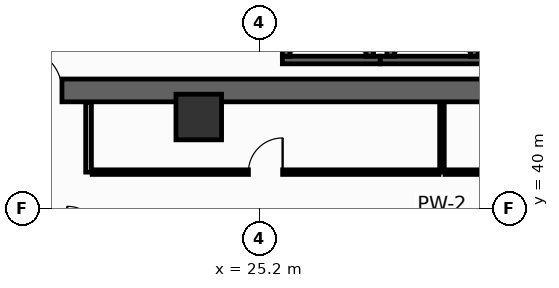
"""IFC4 building model, lengths in metres.
Left out: names, types, materials, properties, quantities, classifications, styles, units other than length and angle.
Written with IfcOpenShell. Run it as: python <this file> out.ifc"""

import sys

from ifc_helpers import new_model, si_unit, direction, frame, frame_2d, origin, origin_2d, place, context, subcontext, project, spatial, rectangle, hollow_rectangle, extrude, element, fill, save


model = new_model("IFC4")
c1 = context("Model", 3, precision=1e-05, world=origin(), true_north=direction((0.0, 1.0)))
c2 = subcontext(c1, "Body", "Model", "MODEL_VIEW")
j1 = project(units=[si_unit("LENGTHUNIT", "METRE"), si_unit("PLANEANGLEUNIT", "RADIAN")], contexts=[c1])
p1 = place(None, origin())
s1 = spatial("IfcSite", under=j1, at=p1, CompositionType="ELEMENT")
p2 = place(p1, origin())
s2 = spatial("IfcBuilding", under=s1, at=p2, CompositionType="ELEMENT")
p3 = place(p2, frame((0.0, 0.0, 97.2)))
s3 = spatial("IfcBuildingStorey", under=s2, at=p3, CompositionType="ELEMENT", Elevation=97.2)
p4 = place(p3, frame((13.5, 43.1, 0.0), z_axis=(0.0, 0.0, 1.0), x_axis=(1.0, 0.0, 0.0)))
e1 = element("IfcWall", 1, at=p4, inside=s3, PredefinedType="SHEAR", context=c2, shape_type="SweptSolid", body=[
    extrude(rectangle(XDim=32.9, YDim=0.6, at=frame_2d((16.45, 0.0))), origin(), (0.0, 0.0, 1.0), 4.15),
])
p5 = place(p4, frame((5.4, 0.0, 0.0)))
e2 = element("IfcOpeningElement", 2, at=p5, cuts=e1, PredefinedType="OPENING", context=c2, shape_type="SweptSolid", body=[
    extrude(rectangle(XDim=1.1, YDim=2.15, at=frame_2d((0.55, 1.075))), frame((0.0, 0.31, 0.0), z_axis=(0.0, -1.0, 0.0), x_axis=(1.0, 0.0, 0.0)), (0.0, 0.0, 1.0), 0.62),
])
p6 = place(p4, frame((25.6, 0.0, 0.0)))
e3 = element("IfcOpeningElement", 3, at=p6, cuts=e1, PredefinedType="OPENING", context=c2, shape_type="SweptSolid", body=[
    extrude(rectangle(XDim=1.1, YDim=2.15, at=frame_2d((0.55, 1.075))), frame((0.0, 0.31, 0.0), z_axis=(0.0, -1.0, 0.0), x_axis=(1.0, 0.0, 0.0)), (0.0, 0.0, 1.0), 0.62),
])
p7 = place(p3, frame((23.6, 42.4, 0.0), z_axis=(0.0, 0.0, 1.0), x_axis=(1.0, 0.0, 0.0)))
e4 = element("IfcColumn", 4, at=p7, inside=s3, PredefinedType="COLUMN", context=c2, shape_type="SweptSolid", body=[
    extrude(hollow_rectangle(XDim=1.2, YDim=1.2, WallThickness=0.055, at=origin_2d()), origin(), (0.0, 0.0, 1.0), 4.4),
])
p8 = place(p3, frame((25.8, 43.9, 0.0), z_axis=(0.0, 0.0, 1.0), x_axis=(1.0, 0.0, 0.0)))
e5 = element("IfcWall", 5, at=p8, inside=s3, PredefinedType="SHEAR", context=c2, shape_type="SweptSolid", body=[
    extrude(rectangle(XDim=2.575, YDim=0.2, at=frame_2d((1.288, 0.0))), origin(), (0.0, 0.0, 1.0), 4.15),
])
for number, where, z_axis, x_axis in (
    (6, (25.9, 44.0, 0.0), (0.0, 0.0, 1.0), (0.0, 1.0, 0.0)),
    (7, (28.1, 44.0, 0.0), (0.0, 0.0, 1.0), (0.0, 1.0, 0.0)),
):
    element("IfcWall", number, at=place(p3, frame(where, z_axis=z_axis, x_axis=x_axis)), inside=s3, PredefinedType="SHEAR", context=c2, shape_type="SweptSolid", body=[
        extrude(rectangle(XDim=2.3, YDim=0.2, at=frame_2d((1.15, 0.0))), origin(), (0.0, 0.0, 1.0), 4.15),
    ])
p9 = place(p3, frame((28.375, 43.9, 0.0), z_axis=(0.0, 0.0, 1.0), x_axis=(1.0, 0.0, 0.0)))
e8 = element("IfcWall", 8, at=p9, inside=s3, PredefinedType="SHEAR", context=c2, shape_type="SweptSolid", body=[
    extrude(rectangle(XDim=2.75, YDim=0.2, at=frame_2d((1.375, 0.0))), origin(), (0.0, 0.0, 1.0), 4.15),
])
for number, where, z_axis, x_axis in (
    (9, (28.65, 44.0, 0.0), (0.0, 0.0, 1.0), (0.0, 1.0, 0.0)),
    (10, (30.85, 44.0, 0.0), (0.0, 0.0, 1.0), (0.0, 1.0, 0.0)),
):
    element("IfcWall", number, at=place(p3, frame(where, z_axis=z_axis, x_axis=x_axis)), inside=s3, PredefinedType="SHEAR", context=c2, shape_type="SweptSolid", body=[
        extrude(rectangle(XDim=2.3, YDim=0.2, at=frame_2d((1.15, 0.0))), origin(), (0.0, 0.0, 1.0), 4.15),
    ])
p10 = place(p3, frame((20.7, 40.95, 0.0), z_axis=(0.0, 0.0, 1.0), x_axis=(0.0, 1.0, 0.0)))
e11 = element("IfcWall", 11, at=p10, inside=s3, PredefinedType="PARTITIONING", context=c2, shape_type="SweptSolid", body=[
    extrude(rectangle(XDim=1.83, YDim=0.15, at=frame_2d((0.915, 0.0))), origin(), (0.0, 0.0, 1.0), 4.15),
])
p11 = place(p3, frame((30.0, 40.95, 0.0), z_axis=(0.0, 0.0, 1.0), x_axis=(0.0, 1.0, 0.0)))
e12 = element("IfcWall", 12, at=p11, inside=s3, PredefinedType="PARTITIONING", context=c2, shape_type="SweptSolid", body=[
    extrude(rectangle(XDim=1.83, YDim=0.12, at=frame_2d((0.915, 0.0))), origin(), (0.0, 0.0, 1.0), 3.335),
])
p12 = place(p3, frame((20.795, 40.95, 0.0), z_axis=(0.0, 0.0, 1.0), x_axis=(1.0, 0.0, 0.0)))
e13 = element("IfcWall", 13, at=p12, inside=s3, PredefinedType="PARTITIONING", context=c2, shape_type="SweptSolid", body=[
    extrude(rectangle(XDim=9.125, YDim=0.12, at=frame_2d((4.562, 0.0))), origin(), (0.0, 0.0, 1.0), 2.735),
])
p13 = place(p12, frame((4.112, 0.0, 0.0)))
e14 = element("IfcOpeningElement", 14, at=p13, cuts=e13, PredefinedType="OPENING", context=c2, shape_type="SweptSolid", body=[
    extrude(rectangle(XDim=0.9, YDim=2.1, at=frame_2d((0.45, 1.05))), frame((0.0, 0.07, 0.0), z_axis=(0.0, -1.0, 0.0), x_axis=(1.0, 0.0, 0.0)), (0.0, 0.0, 1.0), 0.14),
])
p14 = place(p3, frame((30.08, 40.95, 0.0), z_axis=(0.0, 0.0, 1.0), x_axis=(1.0, 0.0, 0.0)))
e15 = element("IfcWall", 15, at=p14, inside=s3, PredefinedType="PARTITIONING", context=c2, shape_type="SweptSolid", body=[
    extrude(rectangle(XDim=8.625, YDim=0.12, at=frame_2d((4.312, 0.0))), origin(), (0.0, 0.0, 1.0), 2.735),
])
p15 = place(p14, frame((3.788, 0.0, 0.0)))
e16 = element("IfcOpeningElement", 16, at=p15, cuts=e15, PredefinedType="OPENING", context=c2, shape_type="SweptSolid", body=[
    extrude(rectangle(XDim=1.05, YDim=2.15, at=frame_2d((0.525, 1.075))), frame((0.0, 0.07, 0.0), z_axis=(0.0, -1.0, 0.0), x_axis=(1.0, 0.0, 0.0)), (0.0, 0.0, 1.0), 0.14),
])
p16 = place(p5, origin())
e17 = element("IfcDoor", 17, at=p16, inside=s3, OperationType="SINGLE_SWING_LEFT", PredefinedType="DOOR", context=c2, shape_type="SweptSolid", body=[
    extrude(rectangle(XDim=1.1, YDim=2.15, at=frame_2d((0.55, 1.075))), frame((0.0, 0.025, 0.0), z_axis=(0.0, -1.0, 0.0), x_axis=(1.0, 0.0, 0.0)), (0.0, 0.0, 1.0), 0.05),
])
fill(e2, e17)
p17 = place(p13, origin())
e18 = element("IfcDoor", 18, at=p17, inside=s3, OperationType="SINGLE_SWING_RIGHT", PredefinedType="DOOR", context=c2, shape_type="SweptSolid", body=[
    extrude(rectangle(XDim=0.9, YDim=2.1, at=frame_2d((0.45, 1.05))), frame((0.0, 0.025, 0.0), z_axis=(0.0, -1.0, 0.0), x_axis=(1.0, 0.0, 0.0)), (0.0, 0.0, 1.0), 0.05),
])
fill(e14, e18)
save(model, sys.argv[1])
